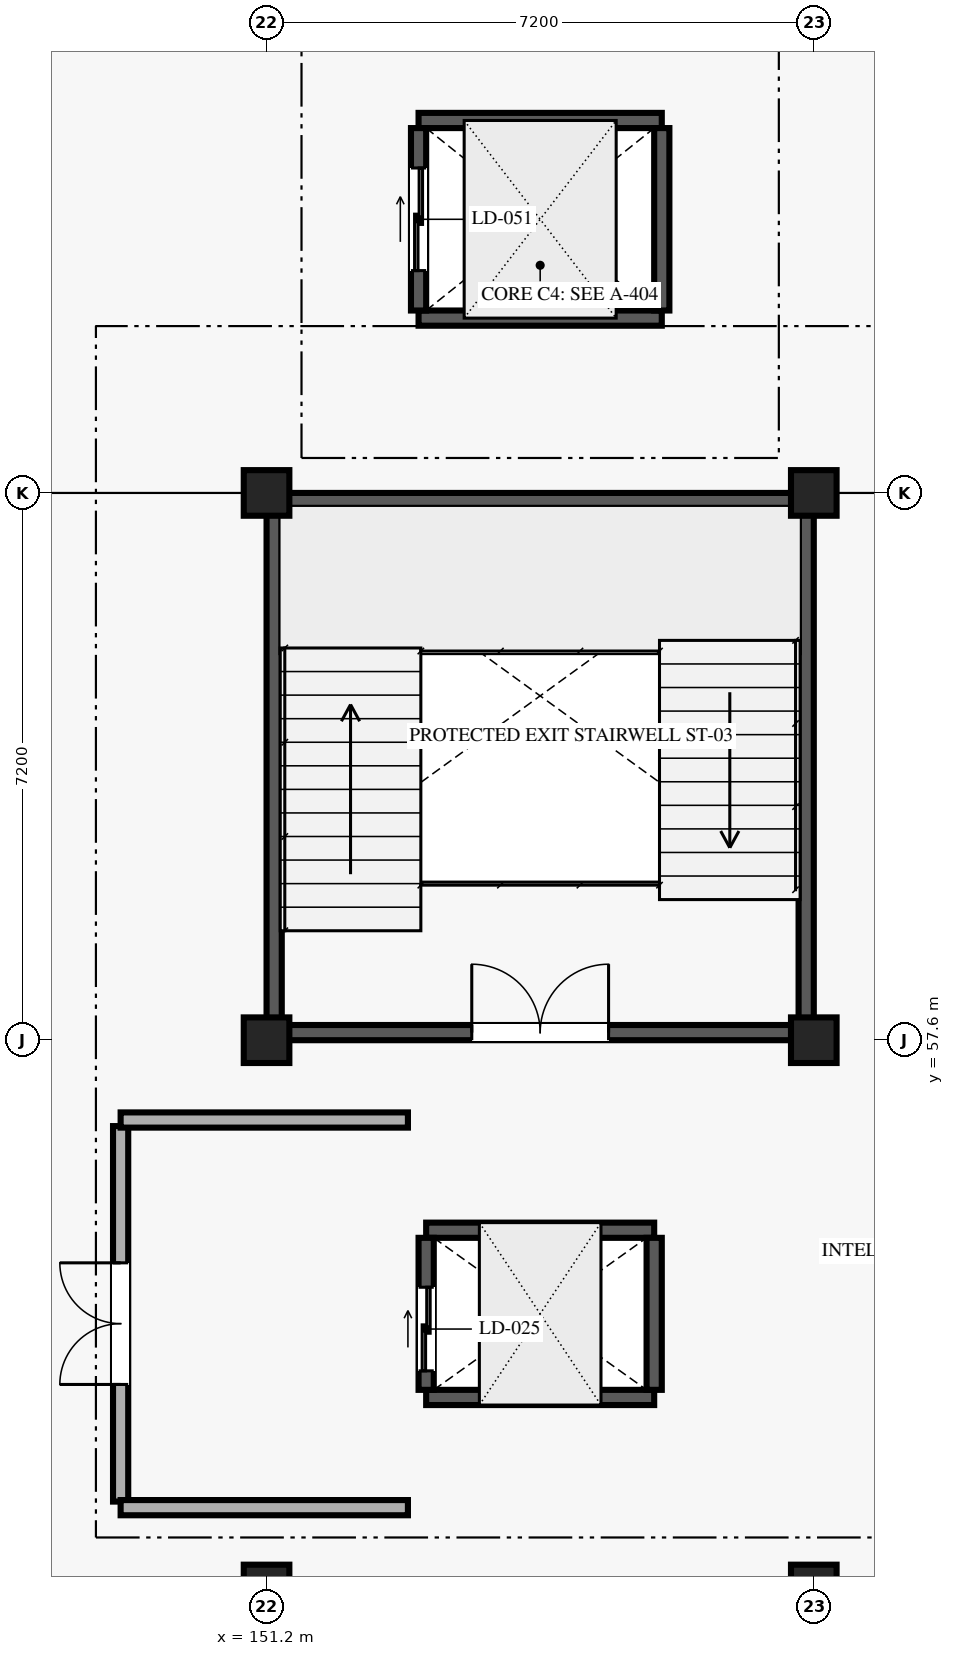
"""IFC4 building model, lengths in metres.
Left out: names, types, materials, properties, quantities, classifications, styles, units other than length and angle.
Written with IfcOpenShell. Run it as: python <this file> out.ifc"""

import sys

from ifc_helpers import new_model, si_unit, direction, frame, frame_2d, origin, origin_2d, place, context, subcontext, project, spatial, rectangle, extrude, element, fill, save


model = new_model("IFC4")
c1 = context("Model", 3, precision=1e-05, world=origin(), true_north=direction((0.0, 1.0)))
c2 = subcontext(c1, "Body", "Model", "MODEL_VIEW")
j1 = project(units=[si_unit("LENGTHUNIT", "METRE"), si_unit("PLANEANGLEUNIT", "RADIAN")], contexts=[c1])
p1 = place(None, origin())
s1 = spatial("IfcSite", under=j1, at=p1, CompositionType="ELEMENT")
p2 = place(p1, origin())
s2 = spatial("IfcBuilding", under=s1, at=p2, CompositionType="ELEMENT")
p3 = place(p2, frame((0.0, 0.0, 21.6)))
s3 = spatial("IfcBuildingStorey", under=s2, at=p3, CompositionType="ELEMENT", Elevation=21.6)
for number, where, z_axis, x_axis in (
    (1, (151.2, 50.4, 0.0), (0.0, 0.0, 1.0), (1.0, 0.0, 0.0)),
    (2, (151.2, 57.6, 0.0), (0.0, 0.0, 1.0), (1.0, 0.0, 0.0)),
    (3, (151.2, 64.8, 0.0), (0.0, 0.0, 1.0), (1.0, 0.0, 0.0)),
    (4, (158.4, 50.4, 0.0), (0.0, 0.0, 1.0), (1.0, 0.0, 0.0)),
    (5, (158.4, 57.6, 0.0), (0.0, 0.0, 1.0), (1.0, 0.0, 0.0)),
    (6, (158.4, 64.8, 0.0), (0.0, 0.0, 1.0), (1.0, 0.0, 0.0)),
):
    element("IfcColumn", number, at=place(p3, frame(where, z_axis=z_axis, x_axis=x_axis)), inside=s3, PredefinedType="COLUMN", context=c2, shape_type="SweptSolid", body=[
        extrude(rectangle(XDim=0.6, YDim=0.6, at=origin_2d()), origin(), (0.0, 0.0, 1.0), 4.05),
    ])
p4 = place(p3, frame((151.4, 57.7, 0.0), z_axis=(0.0, 0.0, 1.0), x_axis=(1.0, 0.0, 0.0)))
e7 = element("IfcWall", 7, at=p4, inside=s3, PredefinedType="SHEAR", context=c2, shape_type="SweptSolid", body=[
    extrude(rectangle(XDim=6.8, YDim=0.2, at=frame_2d((3.4, 0.0))), origin(), (0.0, 0.0, 1.0), 3.83),
])
p5 = place(p4, frame((2.5, 0.0, 0.0)))
e8 = element("IfcOpeningElement", 8, at=p5, cuts=e7, PredefinedType="OPENING", context=c2, shape_type="SweptSolid", body=[
    extrude(rectangle(XDim=1.8, YDim=2.2, at=frame_2d((0.9, 1.1))), frame((0.0, 0.11, 0.0), z_axis=(0.0, -1.0, 0.0), x_axis=(1.0, 0.0, 0.0)), (0.0, 0.0, 1.0), 0.22),
])
for number, where, z_axis, x_axis in (
    (9, (151.4, 64.7, 0.0), (0.0, 0.0, 1.0), (1.0, 0.0, 0.0)),
    (10, (151.3, 57.8, 0.0), (0.0, 0.0, 1.0), (0.0, 1.0, 0.0)),
    (11, (158.3, 57.8, 0.0), (0.0, 0.0, 1.0), (0.0, 1.0, 0.0)),
):
    element("IfcWall", number, at=place(p3, frame(where, z_axis=z_axis, x_axis=x_axis)), inside=s3, PredefinedType="SHEAR", context=c2, shape_type="SweptSolid", body=[
        extrude(rectangle(XDim=6.8, YDim=0.2, at=frame_2d((3.4, 0.0))), origin(), (0.0, 0.0, 1.0), 3.83),
    ])
for number, where, z_axis, x_axis in (
    (12, (153.3, 52.9, 0.0), (0.0, 0.0, 1.0), (1.0, 0.0, 0.0)),
    (13, (153.3, 55.1, 0.0), (0.0, 0.0, 1.0), (1.0, 0.0, 0.0)),
):
    element("IfcWall", number, at=place(p3, frame(where, z_axis=z_axis, x_axis=x_axis)), inside=s3, PredefinedType="SHEAR", context=c2, shape_type="SweptSolid", body=[
        extrude(rectangle(XDim=3.0, YDim=0.2, at=frame_2d((1.5, 0.0))), origin(), (0.0, 0.0, 1.0), 3.83),
    ])
p6 = place(p3, frame((153.3, 53.0, 0.0), z_axis=(0.0, 0.0, 1.0), x_axis=(0.0, 1.0, 0.0)))
e14 = element("IfcWall", 14, at=p6, inside=s3, PredefinedType="SHEAR", context=c2, shape_type="SweptSolid", body=[
    extrude(rectangle(XDim=2.0, YDim=0.2, at=frame_2d((1.0, 0.0))), origin(), (0.0, 0.0, 1.0), 3.83),
])
p7 = place(p6, frame((0.25, 0.0, 0.0)))
e15 = element("IfcOpeningElement", 15, at=p7, cuts=e14, PredefinedType="OPENING", context=c2, shape_type="SweptSolid", body=[
    extrude(rectangle(XDim=1.1, YDim=2.15, at=frame_2d((0.55, 1.075))), frame((0.0, 0.11, 0.0), z_axis=(0.0, -1.0, 0.0), x_axis=(1.0, 0.0, 0.0)), (0.0, 0.0, 1.0), 0.22),
])
p8 = place(p3, frame((156.3, 53.0, 0.0), z_axis=(0.0, 0.0, 1.0), x_axis=(0.0, 1.0, 0.0)))
e16 = element("IfcWall", 16, at=p8, inside=s3, PredefinedType="SHEAR", context=c2, shape_type="SweptSolid", body=[
    extrude(rectangle(XDim=2.0, YDim=0.2, at=frame_2d((1.0, 0.0))), origin(), (0.0, 0.0, 1.0), 3.83),
])
for number, where, z_axis, x_axis in (
    (17, (153.2, 67.1, 0.0), (0.0, 0.0, 1.0), (1.0, 0.0, 0.0)),
    (18, (153.2, 69.7, 0.0), (0.0, 0.0, 1.0), (1.0, 0.0, 0.0)),
):
    element("IfcWall", number, at=place(p3, frame(where, z_axis=z_axis, x_axis=x_axis)), inside=s3, PredefinedType="SHEAR", context=c2, shape_type="SweptSolid", body=[
        extrude(rectangle(XDim=3.2, YDim=0.2, at=frame_2d((1.6, 0.0))), origin(), (0.0, 0.0, 1.0), 3.83),
    ])
p9 = place(p3, frame((153.2, 67.2, 0.0), z_axis=(0.0, 0.0, 1.0), x_axis=(0.0, 1.0, 0.0)))
e19 = element("IfcWall", 19, at=p9, inside=s3, PredefinedType="SHEAR", context=c2, shape_type="SweptSolid", body=[
    extrude(rectangle(XDim=2.4, YDim=0.2, at=frame_2d((1.2, 0.0))), origin(), (0.0, 0.0, 1.0), 3.83),
])
p10 = place(p9, frame((0.525, 0.0, 0.0)))
e20 = element("IfcOpeningElement", 20, at=p10, cuts=e19, PredefinedType="OPENING", context=c2, shape_type="SweptSolid", body=[
    extrude(rectangle(XDim=1.35, YDim=2.2, at=frame_2d((0.675, 1.1))), frame((0.0, 0.11, 0.0), z_axis=(0.0, -1.0, 0.0), x_axis=(1.0, 0.0, 0.0)), (0.0, 0.0, 1.0), 0.22),
])
p11 = place(p3, frame((156.4, 67.2, 0.0), z_axis=(0.0, 0.0, 1.0), x_axis=(0.0, 1.0, 0.0)))
e21 = element("IfcWall", 21, at=p11, inside=s3, PredefinedType="SHEAR", context=c2, shape_type="SweptSolid", body=[
    extrude(rectangle(XDim=2.4, YDim=0.2, at=frame_2d((1.2, 0.0))), origin(), (0.0, 0.0, 1.0), 3.83),
])
p12 = place(p3, frame((149.28, 51.53, 0.0), z_axis=(0.0, 0.0, 1.0), x_axis=(0.0, 1.0, 0.0)))
e22 = element("IfcWall", 22, at=p12, inside=s3, PredefinedType="SOLIDWALL", context=c2, shape_type="SweptSolid", body=[
    extrude(rectangle(XDim=4.94, YDim=0.2, at=frame_2d((2.47, 0.0))), origin(), (0.0, 0.0, 1.0), 3.83),
])
p13 = place(p12, frame((1.541, 0.0, 0.0)))
e23 = element("IfcOpeningElement", 23, at=p13, cuts=e22, PredefinedType="OPENING", context=c2, shape_type="SweptSolid", body=[
    extrude(rectangle(XDim=1.6, YDim=2.2, at=frame_2d((0.8, 1.1))), frame((0.0, 0.11, 0.0), z_axis=(0.0, -1.0, 0.0), x_axis=(1.0, 0.0, 0.0)), (0.0, 0.0, 1.0), 0.22),
])
for number, where, z_axis, x_axis in (
    (24, (149.28, 51.45, 0.0), (0.0, 0.0, 1.0), (1.0, 0.0, 0.0)),
    (25, (149.28, 56.55, 0.0), (0.0, 0.0, 1.0), (1.0, 0.0, 0.0)),
):
    element("IfcWall", number, at=place(p3, frame(where, z_axis=z_axis, x_axis=x_axis)), inside=s3, PredefinedType="SOLIDWALL", context=c2, shape_type="SweptSolid", body=[
        extrude(rectangle(XDim=3.78, YDim=0.2, at=frame_2d((1.89, 0.0))), origin(), (0.0, 0.0, 1.0), 3.83),
    ])
p14 = place(p5, origin())
e26 = element("IfcDoor", 26, at=p14, inside=s3, OperationType="DOUBLE_DOOR_SINGLE_SWING", PredefinedType="DOOR", context=c2, shape_type="SweptSolid", body=[
    extrude(rectangle(XDim=1.8, YDim=2.2, at=frame_2d((0.9, 1.1))), frame((0.0, 0.025, 0.0), z_axis=(0.0, -1.0, 0.0), x_axis=(1.0, 0.0, 0.0)), (0.0, 0.0, 1.0), 0.05),
])
fill(e8, e26)
p15 = place(p7, origin())
e27 = element("IfcDoor", 27, at=p15, inside=s3, OperationType="DOUBLE_DOOR_SLIDING", PredefinedType="DOOR", context=c2, shape_type="SweptSolid", body=[
    extrude(rectangle(XDim=1.1, YDim=2.15, at=frame_2d((0.55, 1.075))), frame((0.0, 0.025, 0.0), z_axis=(0.0, -1.0, 0.0), x_axis=(1.0, 0.0, 0.0)), (0.0, 0.0, 1.0), 0.05),
])
fill(e15, e27)
p16 = place(p10, origin())
e28 = element("IfcDoor", 28, at=p16, inside=s3, OperationType="DOUBLE_DOOR_SLIDING", PredefinedType="DOOR", context=c2, shape_type="SweptSolid", body=[
    extrude(rectangle(XDim=1.35, YDim=2.2, at=frame_2d((0.675, 1.1))), frame((0.0, 0.025, 0.0), z_axis=(0.0, -1.0, 0.0), x_axis=(1.0, 0.0, 0.0)), (0.0, 0.0, 1.0), 0.05),
])
fill(e20, e28)
p17 = place(p13, origin())
e29 = element("IfcDoor", 29, at=p17, inside=s3, OperationType="DOUBLE_DOOR_SINGLE_SWING", PredefinedType="DOOR", context=c2, shape_type="SweptSolid", body=[
    extrude(rectangle(XDim=1.6, YDim=2.2, at=frame_2d((0.8, 1.1))), frame((0.0, 0.025, 0.0), z_axis=(0.0, -1.0, 0.0), x_axis=(1.0, 0.0, 0.0)), (0.0, 0.0, 1.0), 0.05),
])
fill(e23, e29)
save(model, sys.argv[1])
